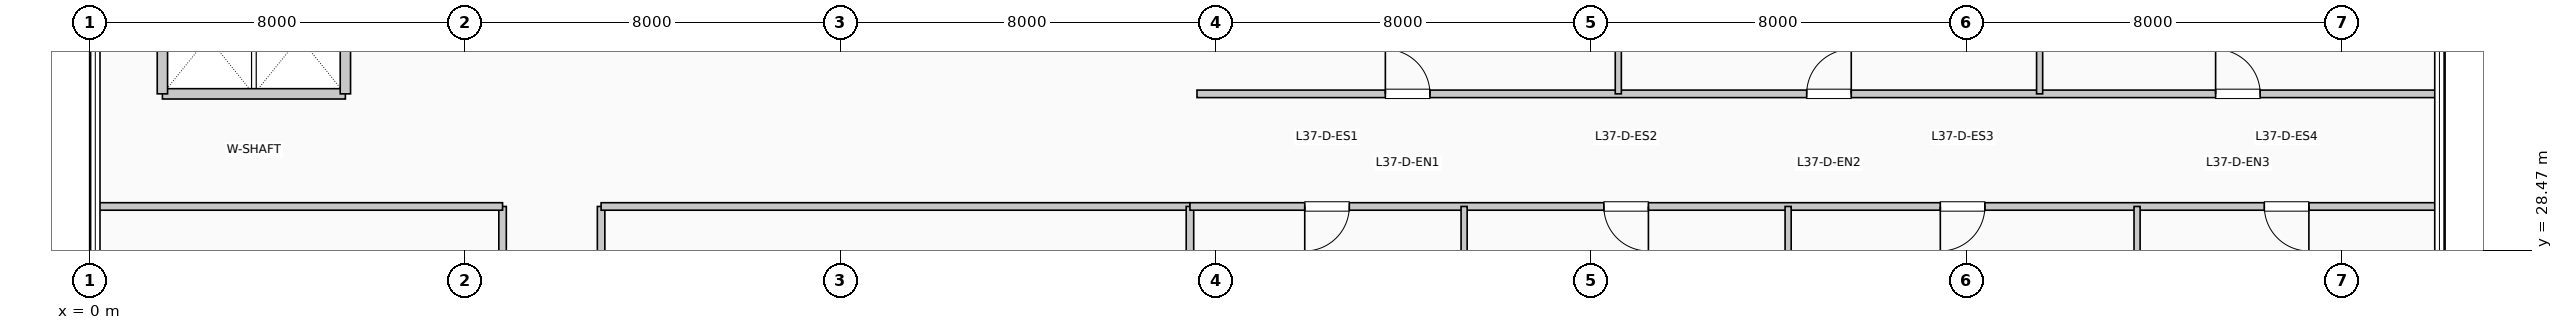
"""IFC4 building model, lengths in metres.
Left out: names, types, materials, properties, quantities, classifications, styles, units other than length and angle.
Written with IfcOpenShell. Run it as: python <this file> out.ifc"""

import sys

from ifc_helpers import new_model, si_unit, direction, frame, frame_2d, origin, place, context, subcontext, project, spatial, rectangle, extrude, element, fill, save


model = new_model("IFC4")
c1 = context("Model", 3, precision=1e-05, world=origin(), true_north=direction((0.0, 1.0)))
c2 = subcontext(c1, "Body", "Model", "MODEL_VIEW")
j1 = project(units=[si_unit("LENGTHUNIT", "METRE"), si_unit("PLANEANGLEUNIT", "RADIAN")], contexts=[c1])
p1 = place(None, origin())
s1 = spatial("IfcSite", under=j1, at=p1, CompositionType="ELEMENT")
p2 = place(p1, origin())
s2 = spatial("IfcBuilding", under=s1, at=p2, CompositionType="ELEMENT")
p3 = place(p2, frame((0.0, 0.0, 154.77)))
s3 = spatial("IfcBuildingStorey", under=s2, at=p3, CompositionType="ELEMENT", Elevation=154.77)
p4 = place(p3, frame((1.55, 31.8, 0.0), z_axis=(0.0, 0.0, 1.0), x_axis=(1.0, 0.0, 0.0)))
e1 = element("IfcWall", 1, at=p4, inside=s3, PredefinedType="PARTITIONING", context=c2, shape_type="SweptSolid", body=[
    extrude(rectangle(XDim=3.9, YDim=0.22, at=frame_2d((1.95, 0.0))), origin(), (0.0, 0.0, 1.0), 3.71),
])
for number, where, z_axis, x_axis in (
    (2, (1.55, 31.8, 0.0), (0.0, 0.0, 1.0), (0.0, 1.0, 0.0)),
    (3, (5.45, 31.8, 0.0), (0.0, 0.0, 1.0), (0.0, 1.0, 0.0)),
):
    element("IfcWall", number, at=place(p3, frame(where, z_axis=z_axis, x_axis=x_axis)), inside=s3, PredefinedType="PARTITIONING", context=c2, shape_type="SweptSolid", body=[
        extrude(rectangle(XDim=2.38, YDim=0.22, at=frame_2d((1.19, 0.0))), origin(), (0.0, 0.0, 1.0), 3.71),
    ])
p5 = place(p3, frame((8.8, 4.39, 0.0), z_axis=(0.0, 0.0, 1.0), x_axis=(0.0, 1.0, 0.0)))
e4 = element("IfcWall", 4, at=p5, inside=s3, PredefinedType="PARTITIONING", context=c2, shape_type="SweptSolid", body=[
    extrude(rectangle(XDim=25.01, YDim=0.16, at=frame_2d((12.505, 0.0))), origin(), (0.0, 0.0, 1.0), 3.71),
])
p6 = place(p5, frame((3.976, 0.0, 0.0), z_axis=(0.0, 0.0, 1.0), x_axis=(-1.0, 0.0, 0.0)))
e5 = element("IfcOpeningElement", 5, at=p6, cuts=e4, PredefinedType="OPENING", context=c2, shape_type="SweptSolid", body=[
    extrude(rectangle(XDim=0.95, YDim=2.15, at=frame_2d((0.475, 1.075))), frame((0.0, 0.09, 0.0), z_axis=(0.0, -1.0, 0.0), x_axis=(1.0, 0.0, 0.0)), (0.0, 0.0, 1.0), 0.18),
])
p7 = place(p5, frame((11.229, 0.0, 0.0), z_axis=(0.0, 0.0, 1.0), x_axis=(-1.0, 0.0, 0.0)))
e6 = element("IfcOpeningElement", 6, at=p7, cuts=e4, PredefinedType="OPENING", context=c2, shape_type="SweptSolid", body=[
    extrude(rectangle(XDim=0.95, YDim=2.15, at=frame_2d((0.475, 1.075))), frame((0.0, 0.09, 0.0), z_axis=(0.0, -1.0, 0.0), x_axis=(1.0, 0.0, 0.0)), (0.0, 0.0, 1.0), 0.18),
])
p8 = place(p5, frame((20.233, 0.0, 0.0), z_axis=(0.0, 0.0, 1.0), x_axis=(-1.0, 0.0, 0.0)))
e7 = element("IfcOpeningElement", 7, at=p8, cuts=e4, PredefinedType="OPENING", context=c2, shape_type="SweptSolid", body=[
    extrude(rectangle(XDim=0.95, YDim=2.15, at=frame_2d((0.475, 1.075))), frame((0.0, 0.09, 0.0), z_axis=(0.0, -1.0, 0.0), x_axis=(1.0, 0.0, 0.0)), (0.0, 0.0, 1.0), 0.18),
])
p9 = place(p3, frame((10.9, 4.39, 0.0), z_axis=(0.0, 0.0, 1.0), x_axis=(0.0, 1.0, 0.0)))
e8 = element("IfcWall", 8, at=p9, inside=s3, PredefinedType="PARTITIONING", context=c2, shape_type="SweptSolid", body=[
    extrude(rectangle(XDim=25.01, YDim=0.16, at=frame_2d((12.505, 0.0))), origin(), (0.0, 0.0, 1.0), 3.71),
])
p10 = place(p9, frame((6.028, 0.0, 0.0)))
e9 = element("IfcOpeningElement", 9, at=p10, cuts=e8, PredefinedType="OPENING", context=c2, shape_type="SweptSolid", body=[
    extrude(rectangle(XDim=0.95, YDim=2.15, at=frame_2d((0.475, 1.075))), frame((0.0, 0.09, 0.0), z_axis=(0.0, -1.0, 0.0), x_axis=(1.0, 0.0, 0.0)), (0.0, 0.0, 1.0), 0.18),
])
p11 = place(p9, frame((19.533, 0.0, 0.0)))
e10 = element("IfcOpeningElement", 10, at=p11, cuts=e8, PredefinedType="OPENING", context=c2, shape_type="SweptSolid", body=[
    extrude(rectangle(XDim=0.95, YDim=2.15, at=frame_2d((0.475, 1.075))), frame((0.0, 0.09, 0.0), z_axis=(0.0, -1.0, 0.0), x_axis=(1.0, 0.0, 0.0)), (0.0, 0.0, 1.0), 0.18),
])
p12 = place(p3, frame((0.19, 29.4, 0.0), z_axis=(0.0, 0.0, 1.0), x_axis=(1.0, 0.0, 0.0)))
e11 = element("IfcWall", 11, at=p12, inside=s3, PredefinedType="PARTITIONING", context=c2, shape_type="SweptSolid", body=[
    extrude(rectangle(XDim=8.61, YDim=0.16, at=frame_2d((4.305, 0.0))), origin(), (0.0, 0.0, 1.0), 3.365),
])
p13 = place(p3, frame((10.9, 29.4, 0.0), z_axis=(0.0, 0.0, 1.0), x_axis=(1.0, 0.0, 0.0)))
e12 = element("IfcWall", 12, at=p13, inside=s3, PredefinedType="PARTITIONING", context=c2, shape_type="SweptSolid", body=[
    extrude(rectangle(XDim=12.55, YDim=0.16, at=frame_2d((6.275, 0.0))), origin(), (0.0, 0.0, 1.0), 3.365),
])
p14 = place(p3, frame((23.45, 0.19, 0.0), z_axis=(0.0, 0.0, 1.0), x_axis=(0.0, 1.0, 0.0)))
e13 = element("IfcWall", 13, at=p14, inside=s3, PredefinedType="PARTITIONING", context=c2, shape_type="SweptSolid", body=[
    extrude(rectangle(XDim=29.21, YDim=0.16, at=frame_2d((14.605, 0.0))), origin(), (0.0, 0.0, 1.0), 3.045),
])
p15 = place(p3, frame((23.45, 29.4, 0.0), z_axis=(0.0, 0.0, 1.0), x_axis=(1.0, 0.0, 0.0)))
e14 = element("IfcWall", 14, at=p15, inside=s3, PredefinedType="PARTITIONING", context=c2, shape_type="SweptSolid", body=[
    extrude(rectangle(XDim=26.56, YDim=0.16, at=frame_2d((13.28, 0.0))), origin(), (0.0, 0.0, 1.0), 3.365),
])
p16 = place(p15, frame((3.396, 0.0, 0.0), z_axis=(0.0, 0.0, 1.0), x_axis=(-1.0, 0.0, 0.0)))
e15 = element("IfcOpeningElement", 15, at=p16, cuts=e14, PredefinedType="OPENING", context=c2, shape_type="SweptSolid", body=[
    extrude(rectangle(XDim=0.95, YDim=2.15, at=frame_2d((0.475, 1.075))), frame((0.0, 0.09, 0.0), z_axis=(0.0, -1.0, 0.0), x_axis=(1.0, 0.0, 0.0)), (0.0, 0.0, 1.0), 0.18),
])
p17 = place(p15, frame((9.771, 0.0, 0.0), z_axis=(0.0, 0.0, 1.0), x_axis=(-1.0, 0.0, 0.0)))
e16 = element("IfcOpeningElement", 16, at=p17, cuts=e14, PredefinedType="OPENING", context=c2, shape_type="SweptSolid", body=[
    extrude(rectangle(XDim=0.95, YDim=2.15, at=frame_2d((0.475, 1.075))), frame((0.0, 0.09, 0.0), z_axis=(0.0, -1.0, 0.0), x_axis=(1.0, 0.0, 0.0)), (0.0, 0.0, 1.0), 0.18),
])
p18 = place(p15, frame((16.942, 0.0, 0.0), z_axis=(0.0, 0.0, 1.0), x_axis=(-1.0, 0.0, 0.0)))
e17 = element("IfcOpeningElement", 17, at=p18, cuts=e14, PredefinedType="OPENING", context=c2, shape_type="SweptSolid", body=[
    extrude(rectangle(XDim=0.95, YDim=2.15, at=frame_2d((0.475, 1.075))), frame((0.0, 0.09, 0.0), z_axis=(0.0, -1.0, 0.0), x_axis=(1.0, 0.0, 0.0)), (0.0, 0.0, 1.0), 0.18),
])
p19 = place(p15, frame((23.848, 0.0, 0.0), z_axis=(0.0, 0.0, 1.0), x_axis=(-1.0, 0.0, 0.0)))
e18 = element("IfcOpeningElement", 18, at=p19, cuts=e14, PredefinedType="OPENING", context=c2, shape_type="SweptSolid", body=[
    extrude(rectangle(XDim=0.95, YDim=2.15, at=frame_2d((0.475, 1.075))), frame((0.0, 0.09, 0.0), z_axis=(0.0, -1.0, 0.0), x_axis=(1.0, 0.0, 0.0)), (0.0, 0.0, 1.0), 0.18),
])
p20 = place(p3, frame((23.6, 31.8, 0.0), z_axis=(0.0, 0.0, 1.0), x_axis=(1.0, 0.0, 0.0)))
e19 = element("IfcWall", 19, at=p20, inside=s3, PredefinedType="PARTITIONING", context=c2, shape_type="SweptSolid", body=[
    extrude(rectangle(XDim=26.41, YDim=0.16, at=frame_2d((13.205, 0.0))), origin(), (0.0, 0.0, 1.0), 3.71),
])
p21 = place(p20, frame((4.015, 0.0, 0.0)))
e20 = element("IfcOpeningElement", 20, at=p21, cuts=e19, PredefinedType="OPENING", context=c2, shape_type="SweptSolid", body=[
    extrude(rectangle(XDim=0.95, YDim=2.15, at=frame_2d((0.475, 1.075))), frame((0.0, 0.09, 0.0), z_axis=(0.0, -1.0, 0.0), x_axis=(1.0, 0.0, 0.0)), (0.0, 0.0, 1.0), 0.18),
])
p22 = place(p20, frame((12.994, 0.0, 0.0)))
e21 = element("IfcOpeningElement", 21, at=p22, cuts=e19, PredefinedType="OPENING", context=c2, shape_type="SweptSolid", body=[
    extrude(rectangle(XDim=0.95, YDim=2.15, at=frame_2d((0.475, 1.075))), frame((0.0, 0.09, 0.0), z_axis=(0.0, -1.0, 0.0), x_axis=(1.0, 0.0, 0.0)), (0.0, 0.0, 1.0), 0.18),
])
p23 = place(p20, frame((21.709, 0.0, 0.0)))
e22 = element("IfcOpeningElement", 22, at=p23, cuts=e19, PredefinedType="OPENING", context=c2, shape_type="SweptSolid", body=[
    extrude(rectangle(XDim=0.95, YDim=2.15, at=frame_2d((0.475, 1.075))), frame((0.0, 0.09, 0.0), z_axis=(0.0, -1.0, 0.0), x_axis=(1.0, 0.0, 0.0)), (0.0, 0.0, 1.0), 0.18),
])
for number, where, z_axis, x_axis in (
    (23, (29.293, 22.19, 0.0), (0.0, 0.0, 1.0), (0.0, 1.0, 0.0)),
    (24, (36.199, 22.19, 0.0), (0.0, 0.0, 1.0), (0.0, 1.0, 0.0)),
    (25, (43.635, 22.19, 0.0), (0.0, 0.0, 1.0), (0.0, 1.0, 0.0)),
):
    element("IfcWall", number, at=place(p3, frame(where, z_axis=z_axis, x_axis=x_axis)), inside=s3, PredefinedType="PARTITIONING", context=c2, shape_type="SweptSolid", body=[
        extrude(rectangle(XDim=7.21, YDim=0.13, at=frame_2d((3.605, 0.0))), origin(), (0.0, 0.0, 1.0), 3.71),
    ])
for number, where, z_axis, x_axis in (
    (26, (32.579, 31.8, 0.0), (0.0, 0.0, 1.0), (0.0, 1.0, 0.0)),
    (27, (41.559, 31.8, 0.0), (0.0, 0.0, 1.0), (0.0, 1.0, 0.0)),
):
    element("IfcWall", number, at=place(p3, frame(where, z_axis=z_axis, x_axis=x_axis)), inside=s3, PredefinedType="PARTITIONING", context=c2, shape_type="SweptSolid", body=[
        extrude(rectangle(XDim=14.01, YDim=0.13, at=frame_2d((7.005, 0.0))), origin(), (0.0, 0.0, 1.0), 3.71),
    ])
p24 = place(p16, origin())
e28 = element("IfcDoor", 28, at=p24, inside=s3, OperationType="SINGLE_SWING_LEFT", PredefinedType="DOOR", context=c2, shape_type="SweptSolid", body=[
    extrude(rectangle(XDim=0.95, YDim=2.15, at=frame_2d((0.475, 1.075))), frame((0.0, 0.025, 0.0), z_axis=(0.0, -1.0, 0.0), x_axis=(1.0, 0.0, 0.0)), (0.0, 0.0, 1.0), 0.05),
])
fill(e15, e28)
p25 = place(p17, origin())
e29 = element("IfcDoor", 29, at=p25, inside=s3, OperationType="SINGLE_SWING_RIGHT", PredefinedType="DOOR", context=c2, shape_type="SweptSolid", body=[
    extrude(rectangle(XDim=0.95, YDim=2.15, at=frame_2d((0.475, 1.075))), frame((0.0, 0.025, 0.0), z_axis=(0.0, -1.0, 0.0), x_axis=(1.0, 0.0, 0.0)), (0.0, 0.0, 1.0), 0.05),
])
fill(e16, e29)
p26 = place(p18, origin())
e30 = element("IfcDoor", 30, at=p26, inside=s3, OperationType="SINGLE_SWING_LEFT", PredefinedType="DOOR", context=c2, shape_type="SweptSolid", body=[
    extrude(rectangle(XDim=0.95, YDim=2.15, at=frame_2d((0.475, 1.075))), frame((0.0, 0.025, 0.0), z_axis=(0.0, -1.0, 0.0), x_axis=(1.0, 0.0, 0.0)), (0.0, 0.0, 1.0), 0.05),
])
fill(e17, e30)
p27 = place(p19, origin())
e31 = element("IfcDoor", 31, at=p27, inside=s3, OperationType="SINGLE_SWING_RIGHT", PredefinedType="DOOR", context=c2, shape_type="SweptSolid", body=[
    extrude(rectangle(XDim=0.95, YDim=2.15, at=frame_2d((0.475, 1.075))), frame((0.0, 0.025, 0.0), z_axis=(0.0, -1.0, 0.0), x_axis=(1.0, 0.0, 0.0)), (0.0, 0.0, 1.0), 0.05),
])
fill(e18, e31)
p28 = place(p21, origin())
e32 = element("IfcDoor", 32, at=p28, inside=s3, OperationType="SINGLE_SWING_LEFT", PredefinedType="DOOR", context=c2, shape_type="SweptSolid", body=[
    extrude(rectangle(XDim=0.95, YDim=2.15, at=frame_2d((0.475, 1.075))), frame((0.0, 0.025, 0.0), z_axis=(0.0, -1.0, 0.0), x_axis=(1.0, 0.0, 0.0)), (0.0, 0.0, 1.0), 0.05),
])
fill(e20, e32)
p29 = place(p22, origin())
e33 = element("IfcDoor", 33, at=p29, inside=s3, OperationType="SINGLE_SWING_RIGHT", PredefinedType="DOOR", context=c2, shape_type="SweptSolid", body=[
    extrude(rectangle(XDim=0.95, YDim=2.15, at=frame_2d((0.475, 1.075))), frame((0.0, 0.025, 0.0), z_axis=(0.0, -1.0, 0.0), x_axis=(1.0, 0.0, 0.0)), (0.0, 0.0, 1.0), 0.05),
])
fill(e21, e33)
p30 = place(p23, origin())
e34 = element("IfcDoor", 34, at=p30, inside=s3, OperationType="SINGLE_SWING_LEFT", PredefinedType="DOOR", context=c2, shape_type="SweptSolid", body=[
    extrude(rectangle(XDim=0.95, YDim=2.15, at=frame_2d((0.475, 1.075))), frame((0.0, 0.025, 0.0), z_axis=(0.0, -1.0, 0.0), x_axis=(1.0, 0.0, 0.0)), (0.0, 0.0, 1.0), 0.05),
])
fill(e22, e34)
save(model, sys.argv[1])
